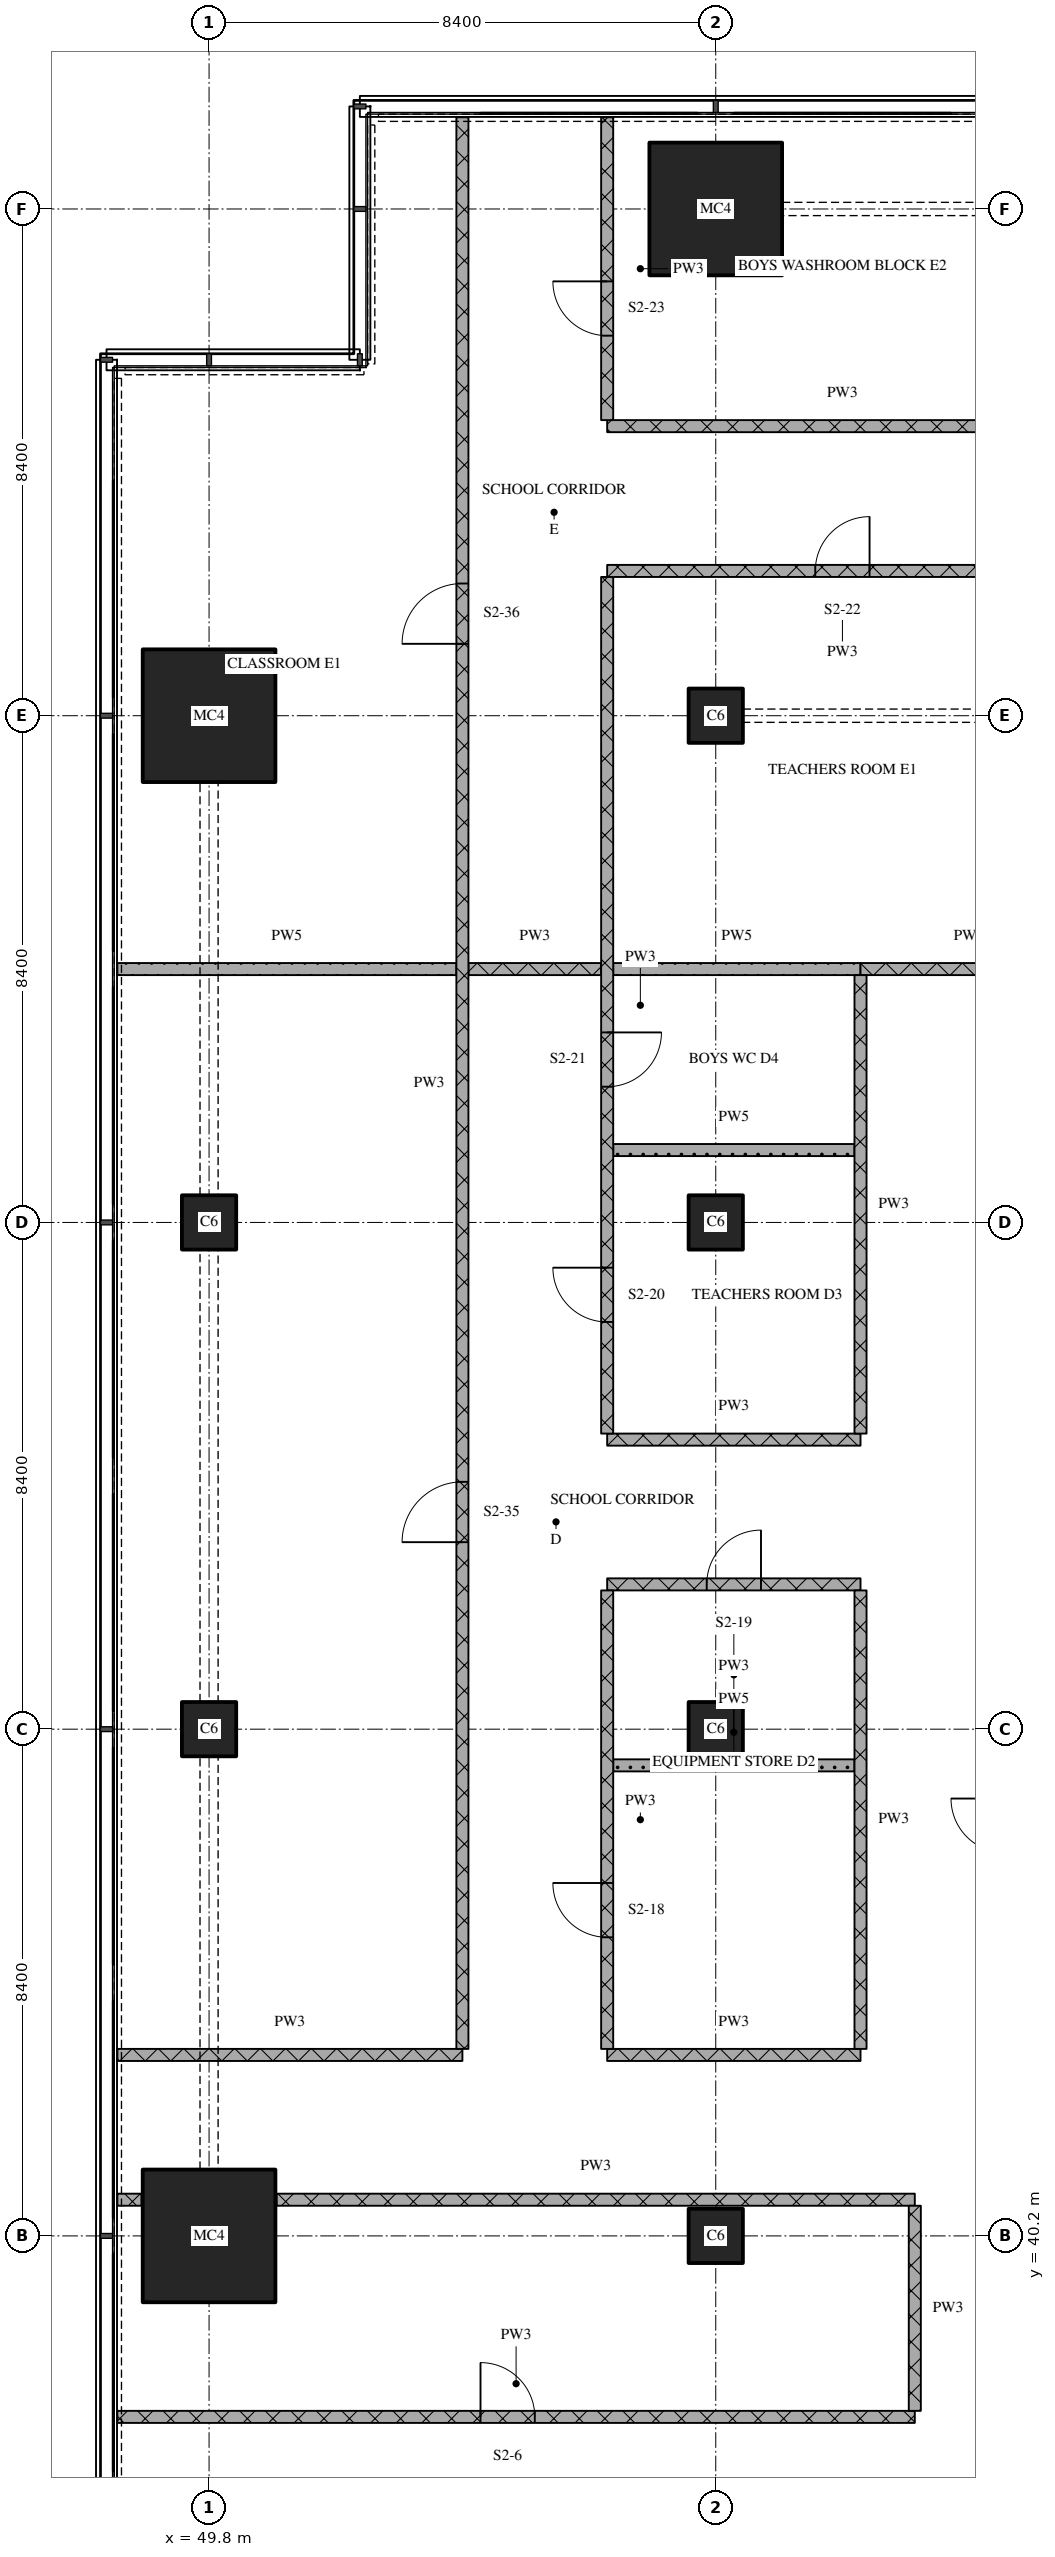
"""IFC4 building model, lengths in metres.
Left out: names, types, materials, properties, quantities, classifications, styles, units other than length and angle.
Written with IfcOpenShell. Run it as: python <this file> out.ifc"""

import sys

from ifc_helpers import new_model, si_unit, direction, frame, frame_2d, origin, origin_2d, place, context, subcontext, project, spatial, rectangle, extrude, element, fill, save


model = new_model("IFC4")
c1 = context("Model", 3, precision=1e-05, world=origin(), true_north=direction((0.0, 1.0)))
c2 = subcontext(c1, "Body", "Model", "MODEL_VIEW")
j1 = project(units=[si_unit("LENGTHUNIT", "METRE"), si_unit("PLANEANGLEUNIT", "RADIAN")], contexts=[c1])
p1 = place(None, origin())
s1 = spatial("IfcSite", under=j1, at=p1, CompositionType="ELEMENT")
p2 = place(p1, origin())
s2 = spatial("IfcBuilding", under=s1, at=p2, CompositionType="ELEMENT")
p3 = place(p2, frame((0.0, 0.0, 32.7)))
s3 = spatial("IfcBuildingStorey", under=s2, at=p3, CompositionType="ELEMENT", Elevation=32.7)
p4 = place(p3, frame((49.8, 40.2, 0.0), z_axis=(0.0, 0.0, 1.0), x_axis=(1.0, 0.0, 0.0)))
e1 = element("IfcColumn", 1, at=p4, inside=s3, PredefinedType="COLUMN", context=c2, shape_type="SweptSolid", body=[
    extrude(rectangle(XDim=2.2, YDim=2.2, at=origin_2d()), origin(), (0.0, 0.0, 1.0), 4.5),
])
for number, where, z_axis, x_axis in (
    (2, (49.8, 48.6, 0.0), (0.0, 0.0, 1.0), (1.0, 0.0, 0.0)),
    (3, (49.8, 57.0, 0.0), (0.0, 0.0, 1.0), (1.0, 0.0, 0.0)),
):
    element("IfcColumn", number, at=place(p3, frame(where, z_axis=z_axis, x_axis=x_axis)), inside=s3, PredefinedType="COLUMN", context=c2, shape_type="SweptSolid", body=[
        extrude(rectangle(XDim=0.9, YDim=0.9, at=origin_2d()), origin(), (0.0, 0.0, 1.0), 4.5),
    ])
p5 = place(p3, frame((49.8, 65.4, 0.0), z_axis=(0.0, 0.0, 1.0), x_axis=(1.0, 0.0, 0.0)))
e4 = element("IfcColumn", 4, at=p5, inside=s3, PredefinedType="COLUMN", context=c2, shape_type="SweptSolid", body=[
    extrude(rectangle(XDim=2.2, YDim=2.2, at=origin_2d()), origin(), (0.0, 0.0, 1.0), 4.5),
])
for number, where, z_axis, x_axis in (
    (5, (58.2, 40.2, 0.0), (0.0, 0.0, 1.0), (1.0, 0.0, 0.0)),
    (6, (58.2, 48.6, 0.0), (0.0, 0.0, 1.0), (1.0, 0.0, 0.0)),
    (7, (58.2, 57.0, 0.0), (0.0, 0.0, 1.0), (1.0, 0.0, 0.0)),
    (8, (58.2, 65.4, 0.0), (0.0, 0.0, 1.0), (1.0, 0.0, 0.0)),
):
    element("IfcColumn", number, at=place(p3, frame(where, z_axis=z_axis, x_axis=x_axis)), inside=s3, PredefinedType="COLUMN", context=c2, shape_type="SweptSolid", body=[
        extrude(rectangle(XDim=0.9, YDim=0.9, at=origin_2d()), origin(), (0.0, 0.0, 1.0), 4.5),
    ])
p6 = place(p3, frame((58.2, 73.8, 0.0), z_axis=(0.0, 0.0, 1.0), x_axis=(1.0, 0.0, 0.0)))
e9 = element("IfcColumn", 9, at=p6, inside=s3, PredefinedType="COLUMN", context=c2, shape_type="SweptSolid", body=[
    extrude(rectangle(XDim=2.2, YDim=2.2, at=origin_2d()), origin(), (0.0, 0.0, 1.0), 4.5),
])
p7 = place(p3, frame((48.28, 37.2, 0.0), z_axis=(0.0, 0.0, 1.0), x_axis=(1.0, 0.0, 0.0)))
e10 = element("IfcWall", 10, at=p7, inside=s3, PredefinedType="PARTITIONING", context=c2, shape_type="SweptSolid", body=[
    extrude(rectangle(XDim=13.22, YDim=0.2, at=frame_2d((6.61, 0.0))), origin(), (0.0, 0.0, 1.0), 4.22),
])
p8 = place(p7, frame((6.02, 0.0, 0.0)))
e11 = element("IfcOpeningElement", 11, at=p8, cuts=e10, PredefinedType="OPENING", context=c2, shape_type="SweptSolid", body=[
    extrude(rectangle(XDim=0.9, YDim=2.1, at=frame_2d((0.45, 1.05))), frame((0.0, 0.11, 0.0), z_axis=(0.0, -1.0, 0.0), x_axis=(1.0, 0.0, 0.0)), (0.0, 0.0, 1.0), 0.22),
])
p9 = place(p3, frame((48.28, 40.8, 0.0), z_axis=(0.0, 0.0, 1.0), x_axis=(1.0, 0.0, 0.0)))
e12 = element("IfcWall", 12, at=p9, inside=s3, PredefinedType="PARTITIONING", context=c2, shape_type="SweptSolid", body=[
    extrude(rectangle(XDim=0.4, YDim=0.2, at=frame_2d((0.2, 0.0))), origin(), (0.0, 0.0, 1.0), 4.22),
])
p10 = place(p3, frame((50.92, 40.8, 0.0), z_axis=(0.0, 0.0, 1.0), x_axis=(1.0, 0.0, 0.0)))
e13 = element("IfcWall", 13, at=p10, inside=s3, PredefinedType="PARTITIONING", context=c2, shape_type="SweptSolid", body=[
    extrude(rectangle(XDim=10.58, YDim=0.2, at=frame_2d((5.29, 0.0))), origin(), (0.0, 0.0, 1.0), 4.22),
])
p11 = place(p3, frame((48.28, 43.2, 0.0), z_axis=(0.0, 0.0, 1.0), x_axis=(1.0, 0.0, 0.0)))
e14 = element("IfcWall", 14, at=p11, inside=s3, PredefinedType="PARTITIONING", context=c2, shape_type="SweptSolid", body=[
    extrude(rectangle(XDim=5.72, YDim=0.2, at=frame_2d((2.86, 0.0))), origin(), (0.0, 0.0, 1.0), 4.22),
])
p12 = place(p3, frame((56.4, 43.2, 0.0), z_axis=(0.0, 0.0, 1.0), x_axis=(1.0, 0.0, 0.0)))
e15 = element("IfcWall", 15, at=p12, inside=s3, PredefinedType="PARTITIONING", context=c2, shape_type="SweptSolid", body=[
    extrude(rectangle(XDim=4.2, YDim=0.2, at=frame_2d((2.1, 0.0))), origin(), (0.0, 0.0, 1.0), 4.22),
])
p13 = place(p3, frame((56.5, 48.0, 0.0), z_axis=(0.0, 0.0, 1.0), x_axis=(1.0, 0.0, 0.0)))
e16 = element("IfcWall", 16, at=p13, inside=s3, PredefinedType="PARTITIONING", context=c2, shape_type="SweptSolid", body=[
    extrude(rectangle(XDim=4.0, YDim=0.2, at=frame_2d((2.0, 0.0))), origin(), (0.0, 0.0, 1.0), 4.22),
])
p14 = place(p3, frame((60.6, 51.0, 0.0), z_axis=(0.0, 0.0, 1.0), x_axis=(-1.0, 0.0, 0.0)))
e17 = element("IfcWall", 17, at=p14, inside=s3, PredefinedType="PARTITIONING", context=c2, shape_type="SweptSolid", body=[
    extrude(rectangle(XDim=4.2, YDim=0.2, at=frame_2d((2.1, 0.0))), origin(), (0.0, 0.0, 1.0), 4.22),
])
p15 = place(p14, frame((1.65, 0.0, 0.0)))
e18 = element("IfcOpeningElement", 18, at=p15, cuts=e17, PredefinedType="OPENING", context=c2, shape_type="SweptSolid", body=[
    extrude(rectangle(XDim=0.9, YDim=2.1, at=frame_2d((0.45, 1.05))), frame((0.0, 0.11, 0.0), z_axis=(0.0, -1.0, 0.0), x_axis=(1.0, 0.0, 0.0)), (0.0, 0.0, 1.0), 0.22),
])
p16 = place(p3, frame((56.4, 53.4, 0.0), z_axis=(0.0, 0.0, 1.0), x_axis=(1.0, 0.0, 0.0)))
e19 = element("IfcWall", 19, at=p16, inside=s3, PredefinedType="PARTITIONING", context=c2, shape_type="SweptSolid", body=[
    extrude(rectangle(XDim=4.2, YDim=0.2, at=frame_2d((2.1, 0.0))), origin(), (0.0, 0.0, 1.0), 4.22),
])
p17 = place(p3, frame((56.5, 58.2, 0.0), z_axis=(0.0, 0.0, 1.0), x_axis=(1.0, 0.0, 0.0)))
e20 = element("IfcWall", 20, at=p17, inside=s3, PredefinedType="PARTITIONING", context=c2, shape_type="SweptSolid", body=[
    extrude(rectangle(XDim=4.0, YDim=0.2, at=frame_2d((2.0, 0.0))), origin(), (0.0, 0.0, 1.0), 4.22),
])
p18 = place(p3, frame((54.1, 61.2, 0.0), z_axis=(0.0, 0.0, 1.0), x_axis=(1.0, 0.0, 0.0)))
e21 = element("IfcWall", 21, at=p18, inside=s3, PredefinedType="PARTITIONING", context=c2, shape_type="SweptSolid", body=[
    extrude(rectangle(XDim=2.2, YDim=0.2, at=frame_2d((1.1, 0.0))), origin(), (0.0, 0.0, 1.0), 4.22),
])
p19 = place(p3, frame((60.6, 61.2, 0.0), z_axis=(0.0, 0.0, 1.0), x_axis=(1.0, 0.0, 0.0)))
e22 = element("IfcWall", 22, at=p19, inside=s3, PredefinedType="PARTITIONING", context=c2, shape_type="SweptSolid", body=[
    extrude(rectangle(XDim=3.6, YDim=0.2, at=frame_2d((1.8, 0.0))), origin(), (0.0, 0.0, 1.0), 4.22),
])
p20 = place(p3, frame((48.28, 61.2, 0.0), z_axis=(0.0, 0.0, 1.0), x_axis=(1.0, 0.0, 0.0)))
e23 = element("IfcWall", 23, at=p20, inside=s3, PredefinedType="PARTITIONING", context=c2, shape_type="SweptSolid", body=[
    extrude(rectangle(XDim=5.62, YDim=0.2, at=frame_2d((2.81, 0.0))), origin(), (0.0, 0.0, 1.0), 4.22),
])
p21 = place(p3, frame((56.5, 61.2, 0.0), z_axis=(0.0, 0.0, 1.0), x_axis=(1.0, 0.0, 0.0)))
e24 = element("IfcWall", 24, at=p21, inside=s3, PredefinedType="PARTITIONING", context=c2, shape_type="SweptSolid", body=[
    extrude(rectangle(XDim=4.1, YDim=0.2, at=frame_2d((2.05, 0.0))), origin(), (0.0, 0.0, 1.0), 4.22),
])
p22 = place(p3, frame((64.2, 67.8, 0.0), z_axis=(0.0, 0.0, 1.0), x_axis=(-1.0, 0.0, 0.0)))
e25 = element("IfcWall", 25, at=p22, inside=s3, PredefinedType="PARTITIONING", context=c2, shape_type="SweptSolid", body=[
    extrude(rectangle(XDim=7.8, YDim=0.2, at=frame_2d((3.9, 0.0))), origin(), (0.0, 0.0, 1.0), 4.22),
])
p23 = place(p22, frame((3.45, 0.0, 0.0)))
e26 = element("IfcOpeningElement", 26, at=p23, cuts=e25, PredefinedType="OPENING", context=c2, shape_type="SweptSolid", body=[
    extrude(rectangle(XDim=0.9, YDim=2.1, at=frame_2d((0.45, 1.05))), frame((0.0, 0.11, 0.0), z_axis=(0.0, -1.0, 0.0), x_axis=(1.0, 0.0, 0.0)), (0.0, 0.0, 1.0), 0.22),
])
p24 = place(p3, frame((56.4, 70.2, 0.0), z_axis=(0.0, 0.0, 1.0), x_axis=(1.0, 0.0, 0.0)))
e27 = element("IfcWall", 27, at=p24, inside=s3, PredefinedType="PARTITIONING", context=c2, shape_type="SweptSolid", body=[
    extrude(rectangle(XDim=7.8, YDim=0.2, at=frame_2d((3.9, 0.0))), origin(), (0.0, 0.0, 1.0), 4.22),
])
p25 = place(p3, frame((54.0, 43.3, 0.0), z_axis=(0.0, 0.0, 1.0), x_axis=(0.0, 1.0, 0.0)))
e28 = element("IfcWall", 28, at=p25, inside=s3, PredefinedType="PARTITIONING", context=c2, shape_type="SweptSolid", body=[
    extrude(rectangle(XDim=32.02, YDim=0.2, at=frame_2d((16.01, 0.0))), origin(), (0.0, 0.0, 1.0), 4.22),
])
p26 = place(p25, frame((8.4, 0.0, 0.0)))
e29 = element("IfcOpeningElement", 29, at=p26, cuts=e28, PredefinedType="OPENING", context=c2, shape_type="SweptSolid", body=[
    extrude(rectangle(XDim=1.0, YDim=2.1, at=frame_2d((0.5, 1.05))), frame((0.0, 0.11, 0.0), z_axis=(0.0, -1.0, 0.0), x_axis=(1.0, 0.0, 0.0)), (0.0, 0.0, 1.0), 0.22),
])
p27 = place(p25, frame((23.292, 0.0, 0.0)))
e30 = element("IfcOpeningElement", 30, at=p27, cuts=e28, PredefinedType="OPENING", context=c2, shape_type="SweptSolid", body=[
    extrude(rectangle(XDim=1.0, YDim=2.1, at=frame_2d((0.5, 1.05))), frame((0.0, 0.11, 0.0), z_axis=(0.0, -1.0, 0.0), x_axis=(1.0, 0.0, 0.0)), (0.0, 0.0, 1.0), 0.22),
])
p28 = place(p3, frame((56.4, 50.9, 0.0), z_axis=(0.0, 0.0, 1.0), x_axis=(0.0, -1.0, 0.0)))
e31 = element("IfcWall", 31, at=p28, inside=s3, PredefinedType="PARTITIONING", context=c2, shape_type="SweptSolid", body=[
    extrude(rectangle(XDim=7.6, YDim=0.2, at=frame_2d((3.8, 0.0))), origin(), (0.0, 0.0, 1.0), 4.22),
])
p29 = place(p28, frame((4.85, 0.0, 0.0)))
e32 = element("IfcOpeningElement", 32, at=p29, cuts=e31, PredefinedType="OPENING", context=c2, shape_type="SweptSolid", body=[
    extrude(rectangle(XDim=0.9, YDim=2.1, at=frame_2d((0.45, 1.05))), frame((0.0, 0.11, 0.0), z_axis=(0.0, -1.0, 0.0), x_axis=(1.0, 0.0, 0.0)), (0.0, 0.0, 1.0), 0.22),
])
p30 = place(p3, frame((56.4, 67.7, 0.0), z_axis=(0.0, 0.0, 1.0), x_axis=(0.0, -1.0, 0.0)))
e33 = element("IfcWall", 33, at=p30, inside=s3, PredefinedType="PARTITIONING", context=c2, shape_type="SweptSolid", body=[
    extrude(rectangle(XDim=14.2, YDim=0.2, at=frame_2d((7.1, 0.0))), origin(), (0.0, 0.0, 1.0), 4.22),
])
p31 = place(p30, frame((7.55, 0.0, 0.0)))
e34 = element("IfcOpeningElement", 34, at=p31, cuts=e33, PredefinedType="OPENING", context=c2, shape_type="SweptSolid", body=[
    extrude(rectangle(XDim=0.9, YDim=2.1, at=frame_2d((0.45, 1.05))), frame((0.0, 0.11, 0.0), z_axis=(0.0, -1.0, 0.0), x_axis=(1.0, 0.0, 0.0)), (0.0, 0.0, 1.0), 0.22),
])
p32 = place(p30, frame((11.45, 0.0, 0.0)))
e35 = element("IfcOpeningElement", 35, at=p32, cuts=e33, PredefinedType="OPENING", context=c2, shape_type="SweptSolid", body=[
    extrude(rectangle(XDim=0.9, YDim=2.1, at=frame_2d((0.45, 1.05))), frame((0.0, 0.11, 0.0), z_axis=(0.0, -1.0, 0.0), x_axis=(1.0, 0.0, 0.0)), (0.0, 0.0, 1.0), 0.22),
])
p33 = place(p3, frame((56.4, 75.32, 0.0), z_axis=(0.0, 0.0, 1.0), x_axis=(0.0, -1.0, 0.0)))
e36 = element("IfcWall", 36, at=p33, inside=s3, PredefinedType="PARTITIONING", context=c2, shape_type="SweptSolid", body=[
    extrude(rectangle(XDim=5.02, YDim=0.2, at=frame_2d((2.51, 0.0))), origin(), (0.0, 0.0, 1.0), 4.22),
])
p34 = place(p33, frame((2.72, 0.0, 0.0)))
e37 = element("IfcOpeningElement", 37, at=p34, cuts=e36, PredefinedType="OPENING", context=c2, shape_type="SweptSolid", body=[
    extrude(rectangle(XDim=0.9, YDim=2.1, at=frame_2d((0.45, 1.05))), frame((0.0, 0.11, 0.0), z_axis=(0.0, -1.0, 0.0), x_axis=(1.0, 0.0, 0.0)), (0.0, 0.0, 1.0), 0.22),
])
p35 = place(p3, frame((60.6, 50.9, 0.0), z_axis=(0.0, 0.0, 1.0), x_axis=(0.0, -1.0, 0.0)))
e38 = element("IfcWall", 38, at=p35, inside=s3, PredefinedType="PARTITIONING", context=c2, shape_type="SweptSolid", body=[
    extrude(rectangle(XDim=7.6, YDim=0.2, at=frame_2d((3.8, 0.0))), origin(), (0.0, 0.0, 1.0), 4.22),
])
p36 = place(p3, frame((60.6, 61.1, 0.0), z_axis=(0.0, 0.0, 1.0), x_axis=(0.0, -1.0, 0.0)))
e39 = element("IfcWall", 39, at=p36, inside=s3, PredefinedType="PARTITIONING", context=c2, shape_type="SweptSolid", body=[
    extrude(rectangle(XDim=7.6, YDim=0.2, at=frame_2d((3.8, 0.0))), origin(), (0.0, 0.0, 1.0), 4.22),
])
p37 = place(p3, frame((61.5, 40.7, 0.0), z_axis=(0.0, 0.0, 1.0), x_axis=(0.0, -1.0, 0.0)))
e40 = element("IfcWall", 40, at=p37, inside=s3, PredefinedType="PARTITIONING", context=c2, shape_type="SweptSolid", body=[
    extrude(rectangle(XDim=3.4, YDim=0.2, at=frame_2d((1.7, 0.0))), origin(), (0.0, 0.0, 1.0), 4.22),
])
p38 = place(p8, origin())
e41 = element("IfcDoor", 41, at=p38, inside=s3, OperationType="SINGLE_SWING_LEFT", PredefinedType="DOOR", context=c2, shape_type="SweptSolid", body=[
    extrude(rectangle(XDim=0.9, YDim=2.1, at=frame_2d((0.45, 1.05))), frame((0.0, 0.025, 0.0), z_axis=(0.0, -1.0, 0.0), x_axis=(1.0, 0.0, 0.0)), (0.0, 0.0, 1.0), 0.05),
])
fill(e11, e41)
p39 = place(p15, origin())
e42 = element("IfcDoor", 42, at=p39, inside=s3, OperationType="SINGLE_SWING_RIGHT", PredefinedType="DOOR", context=c2, shape_type="SweptSolid", body=[
    extrude(rectangle(XDim=0.9, YDim=2.1, at=frame_2d((0.45, 1.05))), frame((0.0, 0.025, 0.0), z_axis=(0.0, -1.0, 0.0), x_axis=(1.0, 0.0, 0.0)), (0.0, 0.0, 1.0), 0.05),
])
fill(e18, e42)
p40 = place(p23, origin())
e43 = element("IfcDoor", 43, at=p40, inside=s3, OperationType="SINGLE_SWING_RIGHT", PredefinedType="DOOR", context=c2, shape_type="SweptSolid", body=[
    extrude(rectangle(XDim=0.9, YDim=2.1, at=frame_2d((0.45, 1.05))), frame((0.0, 0.025, 0.0), z_axis=(0.0, -1.0, 0.0), x_axis=(1.0, 0.0, 0.0)), (0.0, 0.0, 1.0), 0.05),
])
fill(e26, e43)
p41 = place(p26, origin())
e44 = element("IfcDoor", 44, at=p41, inside=s3, OperationType="SINGLE_SWING_LEFT", PredefinedType="DOOR", context=c2, shape_type="SweptSolid", body=[
    extrude(rectangle(XDim=1.0, YDim=2.1, at=frame_2d((0.5, 1.05))), frame((0.0, 0.025, 0.0), z_axis=(0.0, -1.0, 0.0), x_axis=(1.0, 0.0, 0.0)), (0.0, 0.0, 1.0), 0.05),
])
fill(e29, e44)
p42 = place(p27, origin())
e45 = element("IfcDoor", 45, at=p42, inside=s3, OperationType="SINGLE_SWING_LEFT", PredefinedType="DOOR", context=c2, shape_type="SweptSolid", body=[
    extrude(rectangle(XDim=1.0, YDim=2.1, at=frame_2d((0.5, 1.05))), frame((0.0, 0.025, 0.0), z_axis=(0.0, -1.0, 0.0), x_axis=(1.0, 0.0, 0.0)), (0.0, 0.0, 1.0), 0.05),
])
fill(e30, e45)
p43 = place(p29, origin())
e46 = element("IfcDoor", 46, at=p43, inside=s3, OperationType="SINGLE_SWING_RIGHT", PredefinedType="DOOR", context=c2, shape_type="SweptSolid", body=[
    extrude(rectangle(XDim=0.9, YDim=2.1, at=frame_2d((0.45, 1.05))), frame((0.0, 0.025, 0.0), z_axis=(0.0, -1.0, 0.0), x_axis=(1.0, 0.0, 0.0)), (0.0, 0.0, 1.0), 0.05),
])
fill(e32, e46)
p44 = place(p31, origin())
e47 = element("IfcDoor", 47, at=p44, inside=s3, OperationType="SINGLE_SWING_LEFT", PredefinedType="DOOR", context=c2, shape_type="SweptSolid", body=[
    extrude(rectangle(XDim=0.9, YDim=2.1, at=frame_2d((0.45, 1.05))), frame((0.0, 0.025, 0.0), z_axis=(0.0, -1.0, 0.0), x_axis=(1.0, 0.0, 0.0)), (0.0, 0.0, 1.0), 0.05),
])
fill(e34, e47)
p45 = place(p32, origin())
e48 = element("IfcDoor", 48, at=p45, inside=s3, OperationType="SINGLE_SWING_RIGHT", PredefinedType="DOOR", context=c2, shape_type="SweptSolid", body=[
    extrude(rectangle(XDim=0.9, YDim=2.1, at=frame_2d((0.45, 1.05))), frame((0.0, 0.025, 0.0), z_axis=(0.0, -1.0, 0.0), x_axis=(1.0, 0.0, 0.0)), (0.0, 0.0, 1.0), 0.05),
])
fill(e35, e48)
p46 = place(p34, origin())
e49 = element("IfcDoor", 49, at=p46, inside=s3, OperationType="SINGLE_SWING_RIGHT", PredefinedType="DOOR", context=c2, shape_type="SweptSolid", body=[
    extrude(rectangle(XDim=0.9, YDim=2.1, at=frame_2d((0.45, 1.05))), frame((0.0, 0.025, 0.0), z_axis=(0.0, -1.0, 0.0), x_axis=(1.0, 0.0, 0.0)), (0.0, 0.0, 1.0), 0.05),
])
fill(e37, e49)
save(model, sys.argv[1])
